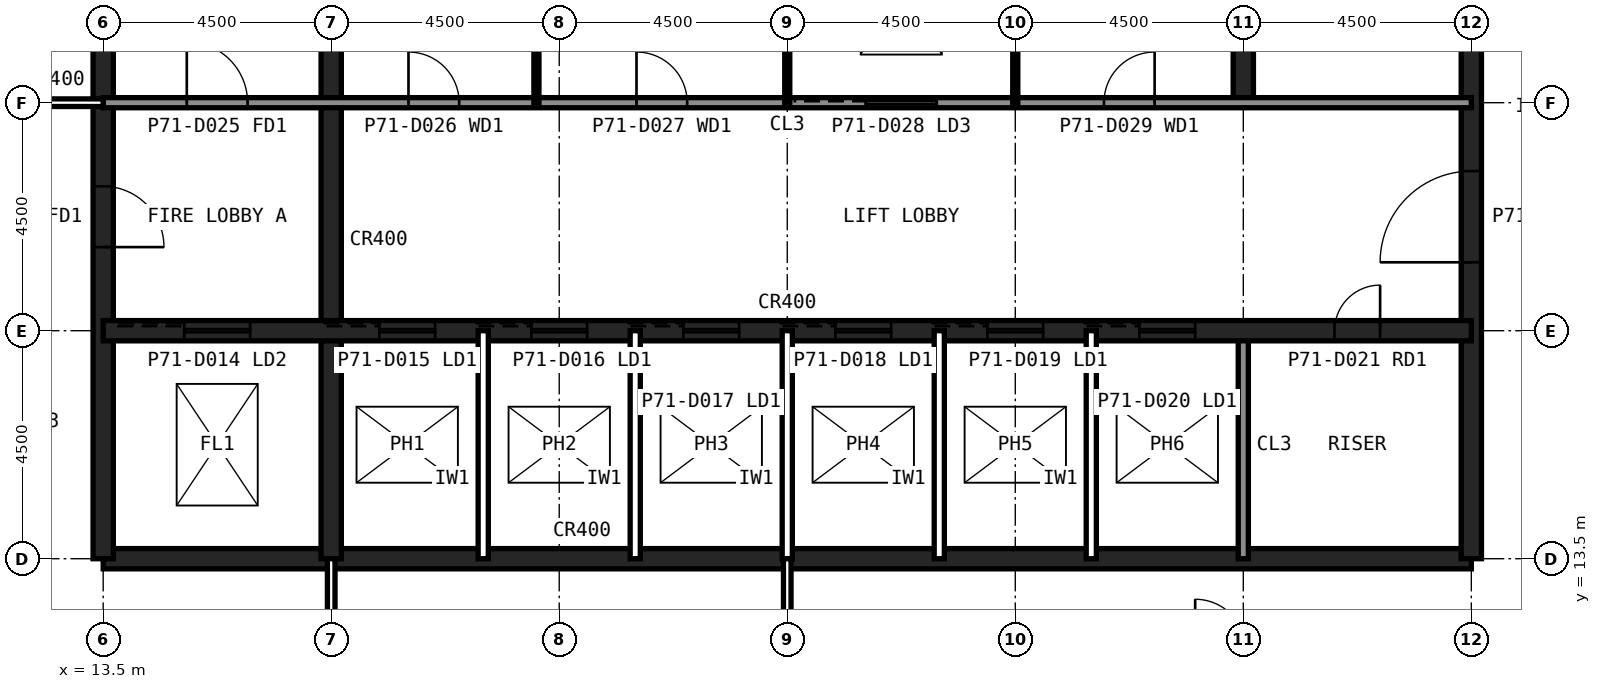
"""IFC4 building model, lengths in metres.
Left out: names, types, materials, properties, quantities, classifications, styles, units other than length and angle.
Written with IfcOpenShell. Run it as: python <this file> out.ifc"""

import sys

from ifc_helpers import new_model, si_unit, direction, frame, frame_2d, origin, place, context, subcontext, project, spatial, rectangle, extrude, element, fill, save


model = new_model("IFC4")
c1 = context("Model", 3, precision=1e-05, world=origin(), true_north=direction((0.0, 1.0)))
c2 = subcontext(c1, "Body", "Model", "MODEL_VIEW")
j1 = project(units=[si_unit("LENGTHUNIT", "METRE"), si_unit("PLANEANGLEUNIT", "RADIAN")], contexts=[c1])
p1 = place(None, origin())
s1 = spatial("IfcSite", under=j1, at=p1, CompositionType="ELEMENT")
p2 = place(p1, origin())
s2 = spatial("IfcBuilding", under=s1, at=p2, CompositionType="ELEMENT")
p3 = place(p2, frame((0.0, 0.0, 294.6)))
s3 = spatial("IfcBuildingStorey", under=s2, at=p3, CompositionType="ELEMENT", Elevation=294.6)
p4 = place(p3, frame((13.5, 13.5, 0.0), z_axis=(0.0, 0.0, 1.0), x_axis=(1.0, 0.0, 0.0)))
e1 = element("IfcWall", 1, at=p4, inside=s3, PredefinedType="SHEAR", context=c2, shape_type="SweptSolid", body=[
    extrude(rectangle(XDim=27.0, YDim=0.4, at=frame_2d((13.5, 0.0))), origin(), (0.0, 0.0, 1.0), 4.0),
])
p5 = place(p3, frame((40.5, 13.5, 0.0), z_axis=(0.0, 0.0, 1.0), x_axis=(0.0, 1.0, 0.0)))
e2 = element("IfcWall", 2, at=p5, inside=s3, PredefinedType="SHEAR", context=c2, shape_type="SweptSolid", body=[
    extrude(rectangle(XDim=27.0, YDim=0.4, at=frame_2d((13.5, 0.0))), origin(), (0.0, 0.0, 1.0), 4.0),
])
p6 = place(p5, frame((5.85, 0.0, 0.0)))
e3 = element("IfcOpeningElement", 3, at=p6, cuts=e2, PredefinedType="OPENING", context=c2, shape_type="SweptSolid", body=[
    extrude(rectangle(XDim=1.8, YDim=2.1, at=frame_2d((0.9, 1.05))), frame((0.0, 0.21, 0.0), z_axis=(0.0, -1.0, 0.0), x_axis=(1.0, 0.0, 0.0)), (0.0, 0.0, 1.0), 0.42),
])
p7 = place(p5, frame((19.65, 0.0, 0.0)))
e4 = element("IfcOpeningElement", 4, at=p7, cuts=e2, PredefinedType="OPENING", context=c2, shape_type="SweptSolid", body=[
    extrude(rectangle(XDim=1.2, YDim=2.1, at=frame_2d((0.6, 1.05))), frame((0.0, 0.21, 0.0), z_axis=(0.0, -1.0, 0.0), x_axis=(1.0, 0.0, 0.0)), (0.0, 0.0, 1.0), 0.42),
])
p8 = place(p3, frame((13.5, 40.5, 0.0), z_axis=(0.0, 0.0, 1.0), x_axis=(0.0, -1.0, 0.0)))
e5 = element("IfcWall", 5, at=p8, inside=s3, PredefinedType="SHEAR", context=c2, shape_type="SweptSolid", body=[
    extrude(rectangle(XDim=27.0, YDim=0.4, at=frame_2d((13.5, 0.0))), origin(), (0.0, 0.0, 1.0), 4.0),
])
p9 = place(p8, frame((19.65, 0.0, 0.0)))
e6 = element("IfcOpeningElement", 6, at=p9, cuts=e5, PredefinedType="OPENING", context=c2, shape_type="SweptSolid", body=[
    extrude(rectangle(XDim=1.2, YDim=2.1, at=frame_2d((0.6, 1.05))), frame((0.0, 0.21, 0.0), z_axis=(0.0, -1.0, 0.0), x_axis=(1.0, 0.0, 0.0)), (0.0, 0.0, 1.0), 0.42),
])
p10 = place(p8, frame((5.85, 0.0, 0.0)))
e7 = element("IfcOpeningElement", 7, at=p10, cuts=e5, PredefinedType="OPENING", context=c2, shape_type="SweptSolid", body=[
    extrude(rectangle(XDim=1.8, YDim=2.1, at=frame_2d((0.9, 1.05))), frame((0.0, 0.21, 0.0), z_axis=(0.0, -1.0, 0.0), x_axis=(1.0, 0.0, 0.0)), (0.0, 0.0, 1.0), 0.42),
])
p11 = place(p3, frame((18.0, 13.5, 0.0), z_axis=(0.0, 0.0, 1.0), x_axis=(0.0, 1.0, 0.0)))
e8 = element("IfcWall", 8, at=p11, inside=s3, PredefinedType="SHEAR", context=c2, shape_type="SweptSolid", body=[
    extrude(rectangle(XDim=18.0, YDim=0.4, at=frame_2d((9.0, 0.0))), origin(), (0.0, 0.0, 1.0), 4.0),
])
p12 = place(p3, frame((36.0, 13.5, 0.0), z_axis=(0.0, 0.0, 1.0), x_axis=(0.0, 1.0, 0.0)))
e9 = element("IfcWall", 9, at=p12, inside=s3, PredefinedType="SOLIDWALL", context=c2, shape_type="SweptSolid", body=[
    extrude(rectangle(XDim=4.5, YDim=0.2, at=frame_2d((2.25, 0.0))), origin(), (0.0, 0.0, 1.0), 3.84),
])
p13 = place(p3, frame((36.0, 22.5, 0.0), z_axis=(0.0, 0.0, 1.0), x_axis=(0.0, 1.0, 0.0)))
e10 = element("IfcWall", 10, at=p13, inside=s3, PredefinedType="SHEAR", context=c2, shape_type="SweptSolid", body=[
    extrude(rectangle(XDim=18.0, YDim=0.4, at=frame_2d((9.0, 0.0))), origin(), (0.0, 0.0, 1.0), 4.0),
])
p14 = place(p3, frame((13.5, 18.0, 0.0), z_axis=(0.0, 0.0, 1.0), x_axis=(1.0, 0.0, 0.0)))
e11 = element("IfcWall", 11, at=p14, inside=s3, PredefinedType="SHEAR", context=c2, shape_type="SweptSolid", body=[
    extrude(rectangle(XDim=27.0, YDim=0.4, at=frame_2d((13.5, 0.0))), origin(), (0.0, 0.0, 1.0), 4.0),
])
p15 = place(p14, frame((24.3, 0.0, 0.0)))
e12 = element("IfcOpeningElement", 12, at=p15, cuts=e11, PredefinedType="OPENING", context=c2, shape_type="SweptSolid", body=[
    extrude(rectangle(XDim=0.9, YDim=2.1, at=frame_2d((0.45, 1.05))), frame((0.0, 0.21, 0.0), z_axis=(0.0, -1.0, 0.0), x_axis=(1.0, 0.0, 0.0)), (0.0, 0.0, 1.0), 0.42),
])
p16 = place(p14, frame((5.45, 0.0, 0.0)))
e13 = element("IfcOpeningElement", 13, at=p16, cuts=e11, PredefinedType="OPENING", context=c2, shape_type="SweptSolid", body=[
    extrude(rectangle(XDim=1.1, YDim=2.1, at=frame_2d((0.55, 1.05))), frame((0.0, 0.21, 0.0), z_axis=(0.0, -1.0, 0.0), x_axis=(1.0, 0.0, 0.0)), (0.0, 0.0, 1.0), 0.42),
])
p17 = place(p14, frame((8.45, 0.0, 0.0)))
e14 = element("IfcOpeningElement", 14, at=p17, cuts=e11, PredefinedType="OPENING", context=c2, shape_type="SweptSolid", body=[
    extrude(rectangle(XDim=1.1, YDim=2.1, at=frame_2d((0.55, 1.05))), frame((0.0, 0.21, 0.0), z_axis=(0.0, -1.0, 0.0), x_axis=(1.0, 0.0, 0.0)), (0.0, 0.0, 1.0), 0.42),
])
p18 = place(p14, frame((11.45, 0.0, 0.0)))
e15 = element("IfcOpeningElement", 15, at=p18, cuts=e11, PredefinedType="OPENING", context=c2, shape_type="SweptSolid", body=[
    extrude(rectangle(XDim=1.1, YDim=2.1, at=frame_2d((0.55, 1.05))), frame((0.0, 0.21, 0.0), z_axis=(0.0, -1.0, 0.0), x_axis=(1.0, 0.0, 0.0)), (0.0, 0.0, 1.0), 0.42),
])
p19 = place(p14, frame((14.45, 0.0, 0.0)))
e16 = element("IfcOpeningElement", 16, at=p19, cuts=e11, PredefinedType="OPENING", context=c2, shape_type="SweptSolid", body=[
    extrude(rectangle(XDim=1.1, YDim=2.1, at=frame_2d((0.55, 1.05))), frame((0.0, 0.21, 0.0), z_axis=(0.0, -1.0, 0.0), x_axis=(1.0, 0.0, 0.0)), (0.0, 0.0, 1.0), 0.42),
])
p20 = place(p14, frame((17.45, 0.0, 0.0)))
e17 = element("IfcOpeningElement", 17, at=p20, cuts=e11, PredefinedType="OPENING", context=c2, shape_type="SweptSolid", body=[
    extrude(rectangle(XDim=1.1, YDim=2.1, at=frame_2d((0.55, 1.05))), frame((0.0, 0.21, 0.0), z_axis=(0.0, -1.0, 0.0), x_axis=(1.0, 0.0, 0.0)), (0.0, 0.0, 1.0), 0.42),
])
p21 = place(p14, frame((20.45, 0.0, 0.0)))
e18 = element("IfcOpeningElement", 18, at=p21, cuts=e11, PredefinedType="OPENING", context=c2, shape_type="SweptSolid", body=[
    extrude(rectangle(XDim=1.1, YDim=2.1, at=frame_2d((0.55, 1.05))), frame((0.0, 0.21, 0.0), z_axis=(0.0, -1.0, 0.0), x_axis=(1.0, 0.0, 0.0)), (0.0, 0.0, 1.0), 0.42),
])
p22 = place(p14, frame((1.6, 0.0, 0.0)))
e19 = element("IfcOpeningElement", 19, at=p22, cuts=e11, PredefinedType="OPENING", context=c2, shape_type="SweptSolid", body=[
    extrude(rectangle(XDim=1.3, YDim=2.2, at=frame_2d((0.65, 1.1))), frame((0.0, 0.21, 0.0), z_axis=(0.0, -1.0, 0.0), x_axis=(1.0, 0.0, 0.0)), (0.0, 0.0, 1.0), 0.42),
])
p23 = place(p3, frame((13.5, 22.5, 0.0), z_axis=(0.0, 0.0, 1.0), x_axis=(1.0, 0.0, 0.0)))
e20 = element("IfcWall", 20, at=p23, inside=s3, PredefinedType="SOLIDWALL", context=c2, shape_type="SweptSolid", body=[
    extrude(rectangle(XDim=27.0, YDim=0.2, at=frame_2d((13.5, 0.0))), origin(), (0.0, 0.0, 1.0), 3.84),
])
p24 = place(p23, frame((1.65, 0.0, 0.0)))
e21 = element("IfcOpeningElement", 21, at=p24, cuts=e20, PredefinedType="OPENING", context=c2, shape_type="SweptSolid", body=[
    extrude(rectangle(XDim=1.2, YDim=2.1, at=frame_2d((0.6, 1.05))), frame((0.0, 0.11, 0.0), z_axis=(0.0, -1.0, 0.0), x_axis=(1.0, 0.0, 0.0)), (0.0, 0.0, 1.0), 0.22),
])
p25 = place(p23, frame((6.025, 0.0, 0.0)))
e22 = element("IfcOpeningElement", 22, at=p25, cuts=e20, PredefinedType="OPENING", context=c2, shape_type="SweptSolid", body=[
    extrude(rectangle(XDim=1.0, YDim=2.1, at=frame_2d((0.5, 1.05))), frame((0.0, 0.11, 0.0), z_axis=(0.0, -1.0, 0.0), x_axis=(1.0, 0.0, 0.0)), (0.0, 0.0, 1.0), 0.22),
])
p26 = place(p23, frame((10.525, 0.0, 0.0)))
e23 = element("IfcOpeningElement", 23, at=p26, cuts=e20, PredefinedType="OPENING", context=c2, shape_type="SweptSolid", body=[
    extrude(rectangle(XDim=1.0, YDim=2.1, at=frame_2d((0.5, 1.05))), frame((0.0, 0.11, 0.0), z_axis=(0.0, -1.0, 0.0), x_axis=(1.0, 0.0, 0.0)), (0.0, 0.0, 1.0), 0.22),
])
p27 = place(p23, frame((19.75, 0.0, 0.0)))
e24 = element("IfcOpeningElement", 24, at=p27, cuts=e20, PredefinedType="OPENING", context=c2, shape_type="SweptSolid", body=[
    extrude(rectangle(XDim=1.0, YDim=2.1, at=frame_2d((0.5, 1.05))), frame((0.0, 0.11, 0.0), z_axis=(0.0, -1.0, 0.0), x_axis=(1.0, 0.0, 0.0)), (0.0, 0.0, 1.0), 0.22),
])
p28 = place(p23, frame((15.05, 0.0, 0.0)))
e25 = element("IfcOpeningElement", 25, at=p28, cuts=e20, PredefinedType="OPENING", context=c2, shape_type="SweptSolid", body=[
    extrude(rectangle(XDim=1.4, YDim=2.4, at=frame_2d((0.7, 1.2))), frame((0.0, 0.11, 0.0), z_axis=(0.0, -1.0, 0.0), x_axis=(1.0, 0.0, 0.0)), (0.0, 0.0, 1.0), 0.22),
])
for number, where, z_axis, x_axis in (
    (26, (21.0, 13.5, 0.0), (0.0, 0.0, 1.0), (0.0, 1.0, 0.0)),
    (27, (24.0, 13.5, 0.0), (0.0, 0.0, 1.0), (0.0, 1.0, 0.0)),
    (28, (27.0, 13.5, 0.0), (0.0, 0.0, 1.0), (0.0, 1.0, 0.0)),
    (29, (30.0, 13.5, 0.0), (0.0, 0.0, 1.0), (0.0, 1.0, 0.0)),
    (30, (33.0, 13.5, 0.0), (0.0, 0.0, 1.0), (0.0, 1.0, 0.0)),
):
    element("IfcWall", number, at=place(p3, frame(where, z_axis=z_axis, x_axis=x_axis)), inside=s3, PredefinedType="PARTITIONING", context=c2, shape_type="SweptSolid", body=[
        extrude(rectangle(XDim=4.5, YDim=0.2, at=frame_2d((2.25, 0.0))), origin(), (0.0, 0.0, 1.0), 3.84),
    ])
for number, where, z_axis, x_axis in (
    (31, (22.05, 22.5, 0.0), (0.0, 0.0, 1.0), (0.0, 1.0, 0.0)),
    (32, (27.0, 22.5, 0.0), (0.0, 0.0, 1.0), (0.0, 1.0, 0.0)),
    (33, (31.5, 22.5, 0.0), (0.0, 0.0, 1.0), (0.0, 1.0, 0.0)),
):
    element("IfcWall", number, at=place(p3, frame(where, z_axis=z_axis, x_axis=x_axis)), inside=s3, PredefinedType="PLUMBINGWALL", context=c2, shape_type="SweptSolid", body=[
        extrude(rectangle(XDim=9.0, YDim=0.1, at=frame_2d((4.5, 0.0))), origin(), (0.0, 0.0, 1.0), 3.84),
    ])
p29 = place(p3, frame((10.5, 22.5, 0.0), z_axis=(0.0, 0.0, 1.0), x_axis=(1.0, 0.0, 0.0)))
e34 = element("IfcWall", 34, at=p29, inside=s3, PredefinedType="PARTITIONING", context=c2, shape_type="SweptSolid", body=[
    extrude(rectangle(XDim=3.0, YDim=0.15, at=frame_2d((1.5, 0.0))), origin(), (0.0, 0.0, 1.0), 2.989),
])
p30 = place(p3, frame((27.0, 9.0, 0.0), z_axis=(0.0, 0.0, 1.0), x_axis=(0.0, 1.0, 0.0)))
e35 = element("IfcWall", 35, at=p30, inside=s3, PredefinedType="PARTITIONING", context=c2, shape_type="SweptSolid", body=[
    extrude(rectangle(XDim=4.5, YDim=0.15, at=frame_2d((2.25, 0.0))), origin(), (0.0, 0.0, 1.0), 2.989),
])
p31 = place(p30, frame((1.75, 0.0, 0.0)))
e36 = element("IfcOpeningElement", 36, at=p31, cuts=e35, PredefinedType="OPENING", context=c2, shape_type="SweptSolid", body=[
    extrude(rectangle(XDim=1.0, YDim=2.1, at=frame_2d((0.5, 1.05))), frame((0.0, 0.085, 0.0), z_axis=(0.0, -1.0, 0.0), x_axis=(1.0, 0.0, 0.0)), (0.0, 0.0, 1.0), 0.17),
])
p32 = place(p3, frame((18.0, 13.5, 0.0), z_axis=(0.0, 0.0, 1.0), x_axis=(0.0, -1.0, 0.0)))
e37 = element("IfcWall", 37, at=p32, inside=s3, PredefinedType="PARTITIONING", context=c2, shape_type="SweptSolid", body=[
    extrude(rectangle(XDim=4.5, YDim=0.15, at=frame_2d((2.25, 0.0))), origin(), (0.0, 0.0, 1.0), 2.989),
])
p33 = place(p9, origin())
e38 = element("IfcDoor", 38, at=p33, inside=s3, OperationType="SINGLE_SWING_RIGHT", PredefinedType="DOOR", context=c2, shape_type="SweptSolid", body=[
    extrude(rectangle(XDim=1.2, YDim=2.1, at=frame_2d((0.6, 1.05))), frame((0.0, 0.025, 0.0), z_axis=(0.0, -1.0, 0.0), x_axis=(1.0, 0.0, 0.0)), (0.0, 0.0, 1.0), 0.05),
])
fill(e6, e38)
p34 = place(p6, origin())
e39 = element("IfcDoor", 39, at=p34, inside=s3, OperationType="SINGLE_SWING_LEFT", PredefinedType="DOOR", context=c2, shape_type="SweptSolid", body=[
    extrude(rectangle(XDim=1.8, YDim=2.1, at=frame_2d((0.9, 1.05))), frame((0.0, 0.025, 0.0), z_axis=(0.0, -1.0, 0.0), x_axis=(1.0, 0.0, 0.0)), (0.0, 0.0, 1.0), 0.05),
])
fill(e3, e39)
p35 = place(p24, origin())
e40 = element("IfcDoor", 40, at=p35, inside=s3, OperationType="SINGLE_SWING_LEFT", PredefinedType="DOOR", context=c2, shape_type="SweptSolid", body=[
    extrude(rectangle(XDim=1.2, YDim=2.1, at=frame_2d((0.6, 1.05))), frame((0.0, 0.025, 0.0), z_axis=(0.0, -1.0, 0.0), x_axis=(1.0, 0.0, 0.0)), (0.0, 0.0, 1.0), 0.05),
])
fill(e21, e40)
p36 = place(p25, origin())
e41 = element("IfcDoor", 41, at=p36, inside=s3, OperationType="SINGLE_SWING_LEFT", PredefinedType="DOOR", context=c2, shape_type="SweptSolid", body=[
    extrude(rectangle(XDim=1.0, YDim=2.1, at=frame_2d((0.5, 1.05))), frame((0.0, 0.025, 0.0), z_axis=(0.0, -1.0, 0.0), x_axis=(1.0, 0.0, 0.0)), (0.0, 0.0, 1.0), 0.05),
])
fill(e22, e41)
p37 = place(p26, origin())
e42 = element("IfcDoor", 42, at=p37, inside=s3, OperationType="SINGLE_SWING_LEFT", PredefinedType="DOOR", context=c2, shape_type="SweptSolid", body=[
    extrude(rectangle(XDim=1.0, YDim=2.1, at=frame_2d((0.5, 1.05))), frame((0.0, 0.025, 0.0), z_axis=(0.0, -1.0, 0.0), x_axis=(1.0, 0.0, 0.0)), (0.0, 0.0, 1.0), 0.05),
])
fill(e23, e42)
p38 = place(p27, origin())
e43 = element("IfcDoor", 43, at=p38, inside=s3, OperationType="SINGLE_SWING_RIGHT", PredefinedType="DOOR", context=c2, shape_type="SweptSolid", body=[
    extrude(rectangle(XDim=1.0, YDim=2.1, at=frame_2d((0.5, 1.05))), frame((0.0, 0.025, 0.0), z_axis=(0.0, -1.0, 0.0), x_axis=(1.0, 0.0, 0.0)), (0.0, 0.0, 1.0), 0.05),
])
fill(e24, e43)
p39 = place(p15, origin())
e44 = element("IfcDoor", 44, at=p39, inside=s3, OperationType="SINGLE_SWING_RIGHT", PredefinedType="DOOR", context=c2, shape_type="SweptSolid", body=[
    extrude(rectangle(XDim=0.9, YDim=2.1, at=frame_2d((0.45, 1.05))), frame((0.0, 0.025, 0.0), z_axis=(0.0, -1.0, 0.0), x_axis=(1.0, 0.0, 0.0)), (0.0, 0.0, 1.0), 0.05),
])
fill(e12, e44)
p40 = place(p16, origin())
e45 = element("IfcDoor", 45, at=p40, inside=s3, OperationType="SLIDING_TO_LEFT", PredefinedType="DOOR", context=c2, shape_type="SweptSolid", body=[
    extrude(rectangle(XDim=1.1, YDim=2.1, at=frame_2d((0.55, 1.05))), frame((0.0, 0.025, 0.0), z_axis=(0.0, -1.0, 0.0), x_axis=(1.0, 0.0, 0.0)), (0.0, 0.0, 1.0), 0.05),
])
fill(e13, e45)
p41 = place(p17, origin())
e46 = element("IfcDoor", 46, at=p41, inside=s3, OperationType="SLIDING_TO_LEFT", PredefinedType="DOOR", context=c2, shape_type="SweptSolid", body=[
    extrude(rectangle(XDim=1.1, YDim=2.1, at=frame_2d((0.55, 1.05))), frame((0.0, 0.025, 0.0), z_axis=(0.0, -1.0, 0.0), x_axis=(1.0, 0.0, 0.0)), (0.0, 0.0, 1.0), 0.05),
])
fill(e14, e46)
p42 = place(p18, origin())
e47 = element("IfcDoor", 47, at=p42, inside=s3, OperationType="SLIDING_TO_LEFT", PredefinedType="DOOR", context=c2, shape_type="SweptSolid", body=[
    extrude(rectangle(XDim=1.1, YDim=2.1, at=frame_2d((0.55, 1.05))), frame((0.0, 0.025, 0.0), z_axis=(0.0, -1.0, 0.0), x_axis=(1.0, 0.0, 0.0)), (0.0, 0.0, 1.0), 0.05),
])
fill(e15, e47)
p43 = place(p19, origin())
e48 = element("IfcDoor", 48, at=p43, inside=s3, OperationType="SLIDING_TO_LEFT", PredefinedType="DOOR", context=c2, shape_type="SweptSolid", body=[
    extrude(rectangle(XDim=1.1, YDim=2.1, at=frame_2d((0.55, 1.05))), frame((0.0, 0.025, 0.0), z_axis=(0.0, -1.0, 0.0), x_axis=(1.0, 0.0, 0.0)), (0.0, 0.0, 1.0), 0.05),
])
fill(e16, e48)
p44 = place(p20, origin())
e49 = element("IfcDoor", 49, at=p44, inside=s3, OperationType="SLIDING_TO_LEFT", PredefinedType="DOOR", context=c2, shape_type="SweptSolid", body=[
    extrude(rectangle(XDim=1.1, YDim=2.1, at=frame_2d((0.55, 1.05))), frame((0.0, 0.025, 0.0), z_axis=(0.0, -1.0, 0.0), x_axis=(1.0, 0.0, 0.0)), (0.0, 0.0, 1.0), 0.05),
])
fill(e17, e49)
p45 = place(p21, origin())
e50 = element("IfcDoor", 50, at=p45, inside=s3, OperationType="SLIDING_TO_LEFT", PredefinedType="DOOR", context=c2, shape_type="SweptSolid", body=[
    extrude(rectangle(XDim=1.1, YDim=2.1, at=frame_2d((0.55, 1.05))), frame((0.0, 0.025, 0.0), z_axis=(0.0, -1.0, 0.0), x_axis=(1.0, 0.0, 0.0)), (0.0, 0.0, 1.0), 0.05),
])
fill(e18, e50)
p46 = place(p22, origin())
e51 = element("IfcDoor", 51, at=p46, inside=s3, OperationType="SLIDING_TO_LEFT", PredefinedType="DOOR", context=c2, shape_type="SweptSolid", body=[
    extrude(rectangle(XDim=1.3, YDim=2.2, at=frame_2d((0.65, 1.1))), frame((0.0, 0.025, 0.0), z_axis=(0.0, -1.0, 0.0), x_axis=(1.0, 0.0, 0.0)), (0.0, 0.0, 1.0), 0.05),
])
fill(e19, e51)
p47 = place(p28, origin())
e52 = element("IfcDoor", 52, at=p47, inside=s3, OperationType="SLIDING_TO_LEFT", PredefinedType="DOOR", context=c2, shape_type="SweptSolid", body=[
    extrude(rectangle(XDim=1.4, YDim=2.4, at=frame_2d((0.7, 1.2))), frame((0.0, 0.025, 0.0), z_axis=(0.0, -1.0, 0.0), x_axis=(1.0, 0.0, 0.0)), (0.0, 0.0, 1.0), 0.05),
])
fill(e25, e52)
save(model, sys.argv[1])
